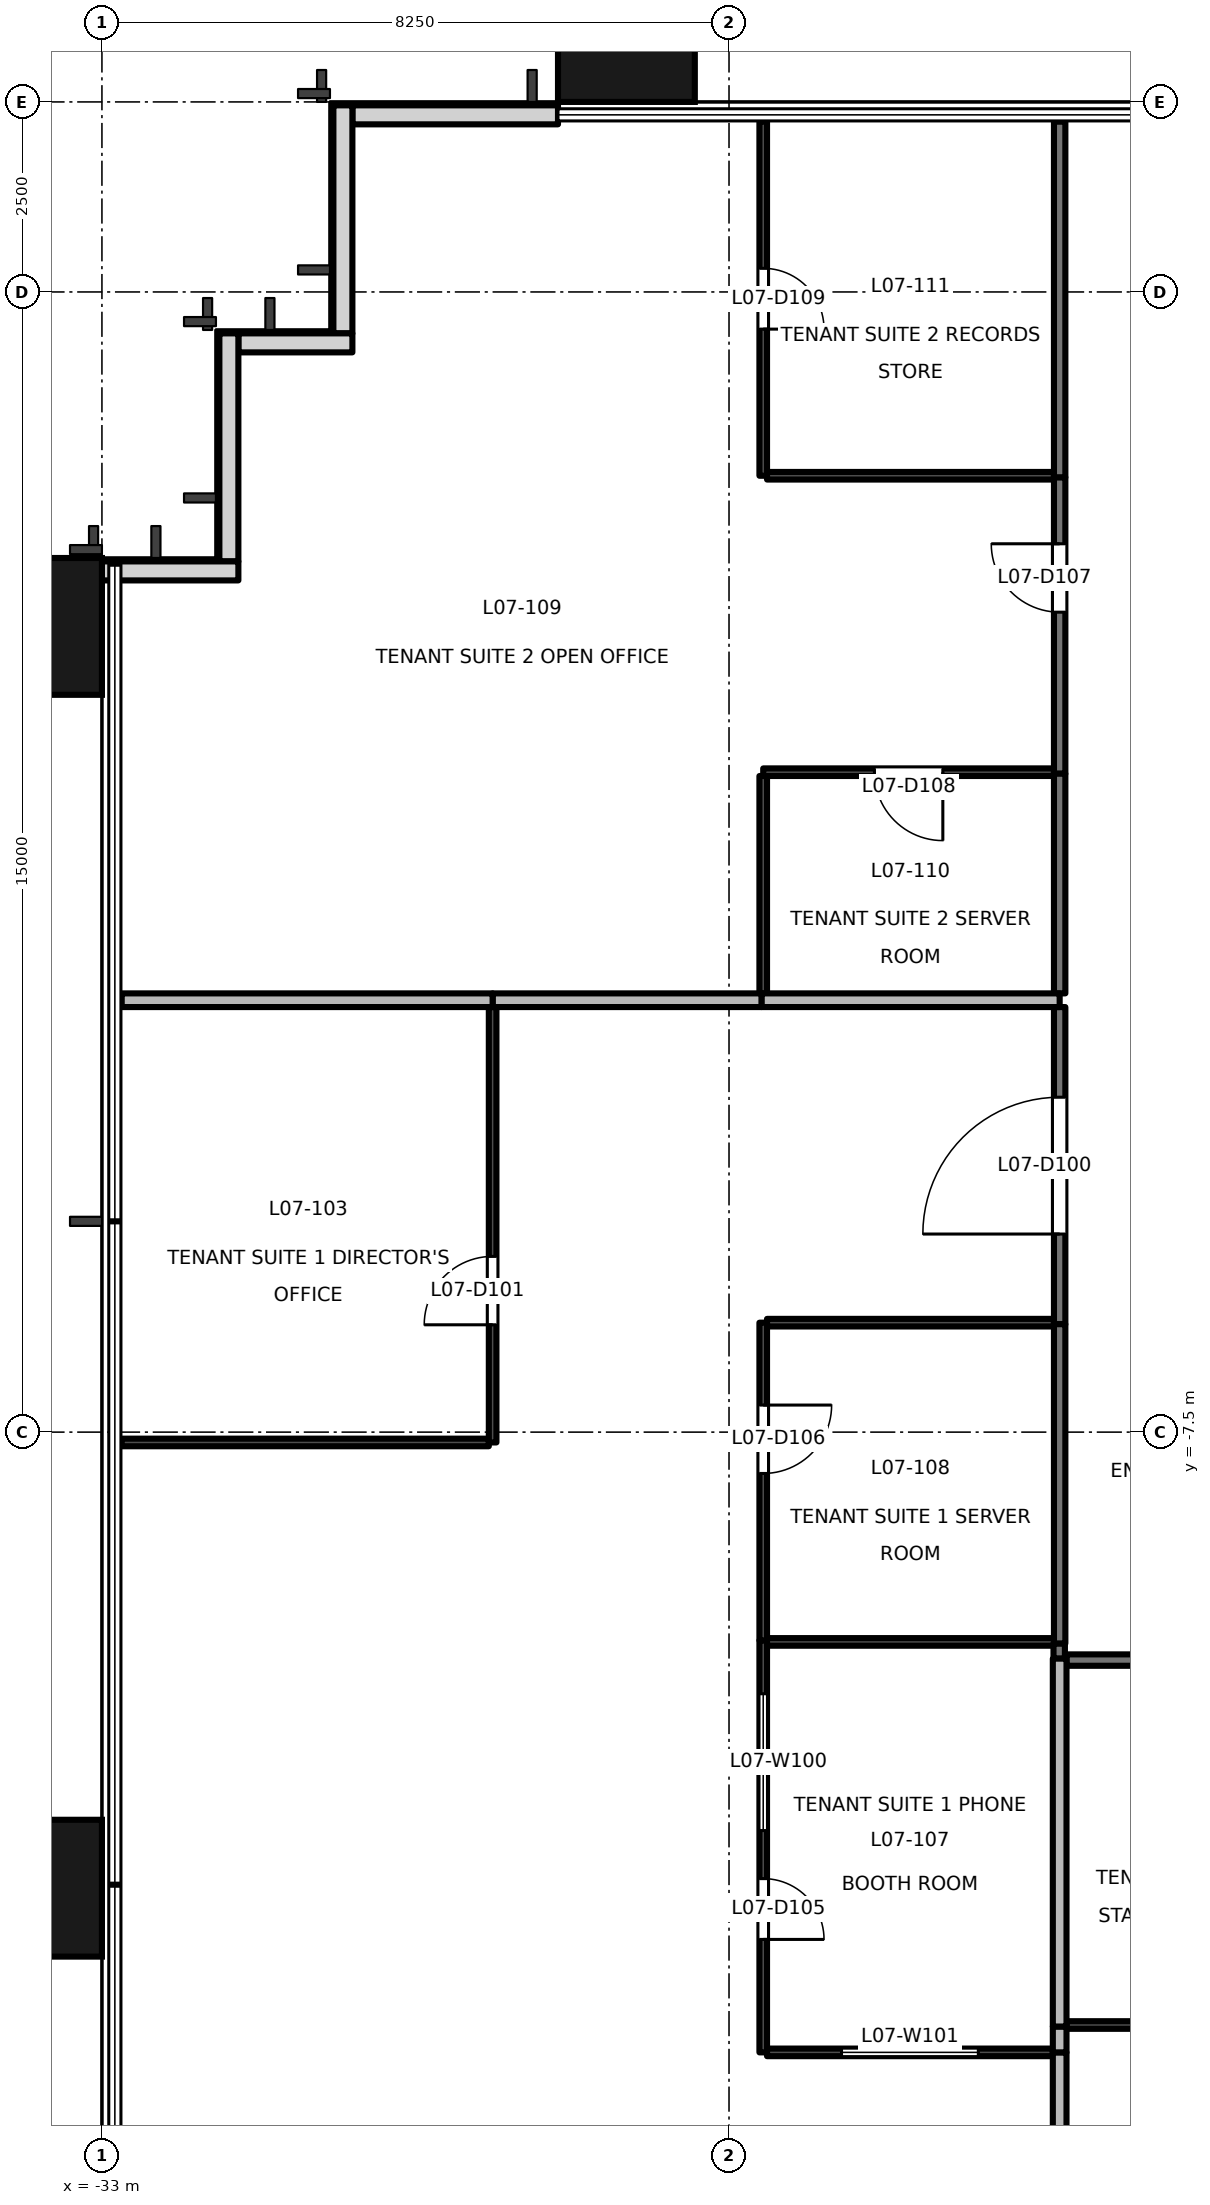
"""IFC4 building model, lengths in metres.
Left out: names, types, materials, properties, quantities, classifications, styles, units other than length and angle.
Written with IfcOpenShell. Run it as: python <this file> out.ifc"""

import sys

from ifc_helpers import new_model, si_unit, direction, frame, frame_2d, origin, origin_2d, place, context, subcontext, project, spatial, rectangle, extrude, element, fill, save


model = new_model("IFC4")
c1 = context("Model", 3, precision=1e-05, world=origin(), true_north=direction((0.0, 1.0)))
c2 = subcontext(c1, "Body", "Model", "MODEL_VIEW")
j1 = project(units=[si_unit("LENGTHUNIT", "METRE"), si_unit("PLANEANGLEUNIT", "RADIAN")], contexts=[c1])
p1 = place(None, origin())
s1 = spatial("IfcSite", under=j1, at=p1, CompositionType="ELEMENT")
p2 = place(p1, origin())
s2 = spatial("IfcBuilding", under=s1, at=p2, CompositionType="ELEMENT")
p3 = place(p2, frame((0.0, 0.0, 36.5)))
s3 = spatial("IfcBuildingStorey", under=s2, at=p3, CompositionType="ELEMENT", Elevation=36.5)
for number, where, z_axis, x_axis in (
    (1, (-33.9, -13.5, -0.2), (0.0, 0.0, 1.0), (0.0, 1.0, 0.0)),
    (2, (-33.9, 3.1, -0.2), (0.0, 0.0, 1.0), (0.0, 1.0, 0.0)),
    (3, (-26.1, 10.9, -0.2), (0.0, 0.0, 1.0), (1.0, 0.0, 0.0)),
):
    element("IfcColumn", number, at=place(p3, frame(where, z_axis=z_axis, x_axis=x_axis)), inside=s3, PredefinedType="COLUMN", context=c2, shape_type="SweptSolid", body=[
        extrude(rectangle(XDim=1.8, YDim=1.8, at=origin_2d()), origin(), (0.0, 0.0, 1.0), 4.1),
    ])
p4 = place(p3, frame((-27.0, 9.83, 0.0), z_axis=(0.0, 0.0, 1.0), x_axis=(-1.0, 0.0, 0.0)))
e4 = element("IfcWall", 4, at=p4, inside=s3, PredefinedType="SOLIDWALL", context=c2, shape_type="SweptSolid", body=[
    extrude(rectangle(XDim=2.705, YDim=0.25, at=frame_2d((1.353, 0.0))), origin(), (0.0, 0.0, 1.0), 3.9),
])
p5 = place(p3, frame((-29.83, 9.955, 0.0), z_axis=(0.0, 0.0, 1.0), x_axis=(0.0, -1.0, 0.0)))
e5 = element("IfcWall", 5, at=p5, inside=s3, PredefinedType="SOLIDWALL", context=c2, shape_type="SweptSolid", body=[
    extrude(rectangle(XDim=3.0, YDim=0.25, at=frame_2d((1.5, 0.0))), origin(), (0.0, 0.0, 1.0), 3.9),
])
p6 = place(p3, frame((-29.705, 6.83, 0.0), z_axis=(0.0, 0.0, 1.0), x_axis=(-1.0, 0.0, 0.0)))
e6 = element("IfcWall", 6, at=p6, inside=s3, PredefinedType="SOLIDWALL", context=c2, shape_type="SweptSolid", body=[
    extrude(rectangle(XDim=1.5, YDim=0.25, at=frame_2d((0.75, 0.0))), origin(), (0.0, 0.0, 1.0), 3.9),
])
p7 = place(p3, frame((-31.33, 6.955, 0.0), z_axis=(0.0, 0.0, 1.0), x_axis=(0.0, -1.0, 0.0)))
e7 = element("IfcWall", 7, at=p7, inside=s3, PredefinedType="SOLIDWALL", context=c2, shape_type="SweptSolid", body=[
    extrude(rectangle(XDim=3.0, YDim=0.25, at=frame_2d((1.5, 0.0))), origin(), (0.0, 0.0, 1.0), 3.9),
])
p8 = place(p3, frame((-31.205, 3.83, 0.0), z_axis=(0.0, 0.0, 1.0), x_axis=(-1.0, 0.0, 0.0)))
e8 = element("IfcWall", 8, at=p8, inside=s3, PredefinedType="SOLIDWALL", context=c2, shape_type="SweptSolid", body=[
    extrude(rectangle(XDim=1.8, YDim=0.25, at=frame_2d((0.9, 0.0))), origin(), (0.0, 0.0, 1.0), 3.9),
])
p9 = place(p3, frame((-20.4, -6.08, 0.0), z_axis=(0.0, 0.0, 1.0), x_axis=(0.0, 1.0, 0.0)))
e9 = element("IfcWall", 9, at=p9, inside=s3, PredefinedType="PARTITIONING", context=c2, shape_type="SweptSolid", body=[
    extrude(rectangle(XDim=4.172, YDim=0.15, at=frame_2d((2.086, 0.0))), origin(), (0.0, 0.0, 1.0), 3.3),
])
p10 = place(p9, frame((1.186, 0.0, 0.0)))
e10 = element("IfcOpeningElement", 10, at=p10, cuts=e9, PredefinedType="OPENING", context=c2, shape_type="SweptSolid", body=[
    extrude(rectangle(XDim=1.8, YDim=2.1, at=frame_2d((0.9, 1.05))), frame((0.0, 0.085, 0.0), z_axis=(0.0, -1.0, 0.0), x_axis=(1.0, 0.0, 0.0)), (0.0, 0.0, 1.0), 0.171),
])
p11 = place(p3, frame((-20.406, -10.48, 0.0), z_axis=(0.0, 0.0, 1.0), x_axis=(0.0, 1.0, 0.0)))
e11 = element("IfcWall", 11, at=p11, inside=s3, PredefinedType="PARTITIONING", context=c2, shape_type="SweptSolid", body=[
    extrude(rectangle(XDim=0.2, YDim=0.15, at=frame_2d((0.1, 0.0))), origin(), (0.0, 0.0, 1.0), 3.9),
])
p12 = place(p3, frame((-20.4, -10.28, 0.0), z_axis=(0.0, 0.0, 1.0), x_axis=(0.0, 1.0, 0.0)))
e12 = element("IfcWall", 12, at=p12, inside=s3, PredefinedType="PARTITIONING", context=c2, shape_type="SweptSolid", body=[
    extrude(rectangle(XDim=4.2, YDim=0.15, at=frame_2d((2.1, 0.0))), origin(), (0.0, 0.0, 1.0), 3.3),
])
p13 = place(p3, frame((-20.4, 1.162, 0.0), z_axis=(0.0, 0.0, 1.0), x_axis=(0.0, 1.0, 0.0)))
e13 = element("IfcWall", 13, at=p13, inside=s3, PredefinedType="PARTITIONING", context=c2, shape_type="SweptSolid", body=[
    extrude(rectangle(XDim=3.9, YDim=0.15, at=frame_2d((1.95, 0.0))), origin(), (0.0, 0.0, 1.0), 3.9),
])
p14 = place(p13, frame((2.125, 0.0, 0.0)))
e14 = element("IfcOpeningElement", 14, at=p14, cuts=e13, PredefinedType="OPENING", context=c2, shape_type="SweptSolid", body=[
    extrude(rectangle(XDim=0.9, YDim=2.1, at=frame_2d((0.45, 1.05))), frame((0.0, 0.085, 0.0), z_axis=(0.0, -1.0, 0.0), x_axis=(1.0, 0.0, 0.0)), (0.0, 0.0, 1.0), 0.171),
])
p15 = place(p3, frame((-20.4, -1.728, 0.0), z_axis=(0.0, 0.0, 1.0), x_axis=(0.0, 1.0, 0.0)))
e15 = element("IfcWall", 15, at=p15, inside=s3, PredefinedType="PARTITIONING", context=c2, shape_type="SweptSolid", body=[
    extrude(rectangle(XDim=2.89, YDim=0.15, at=frame_2d((1.445, 0.0))), origin(), (0.0, 0.0, 1.0), 3.3),
])
p16 = place(p3, frame((-20.4, 5.062, 0.0), z_axis=(0.0, 0.0, 1.0), x_axis=(0.0, 1.0, 0.0)))
e16 = element("IfcWall", 16, at=p16, inside=s3, PredefinedType="PARTITIONING", context=c2, shape_type="SweptSolid", body=[
    extrude(rectangle(XDim=4.678, YDim=0.15, at=frame_2d((2.339, 0.0))), origin(), (0.0, 0.0, 1.0), 3.9),
])
p17 = place(p3, frame((-17.42, -10.499, 0.0), z_axis=(0.0, 0.0, 1.0), x_axis=(-1.0, 0.0, 0.0)))
e17 = element("IfcWall", 17, at=p17, inside=s3, PredefinedType="PARTITIONING", context=c2, shape_type="SweptSolid", body=[
    extrude(rectangle(XDim=2.89, YDim=0.15, at=frame_2d((1.445, 0.0))), origin(), (0.0, 0.0, 1.0), 2.5),
])
p18 = place(p3, frame((-32.74, -7.636, 0.0), z_axis=(0.0, 0.0, 1.0), x_axis=(1.0, 0.0, 0.0)))
e18 = element("IfcWall", 18, at=p18, inside=s3, PredefinedType="PARTITIONING", context=c2, shape_type="SweptSolid", body=[
    extrude(rectangle(XDim=4.83, YDim=0.1, at=frame_2d((2.415, 0.0))), origin(), (0.0, 0.0, 1.0), 3.9),
])
p19 = place(p3, frame((-27.86, -7.636, 0.0), z_axis=(0.0, 0.0, 1.0), x_axis=(0.0, 1.0, 0.0)))
e19 = element("IfcWall", 19, at=p19, inside=s3, PredefinedType="PARTITIONING", context=c2, shape_type="SweptSolid", body=[
    extrude(rectangle(XDim=5.728, YDim=0.1, at=frame_2d((2.864, 0.0))), origin(), (0.0, 0.0, 1.0), 3.3),
])
p20 = place(p19, frame((1.548, 0.0, 0.0)))
e20 = element("IfcOpeningElement", 20, at=p20, cuts=e19, PredefinedType="OPENING", context=c2, shape_type="SweptSolid", body=[
    extrude(rectangle(XDim=0.9, YDim=2.1, at=frame_2d((0.45, 1.05))), frame((0.0, 0.061, 0.0), z_axis=(0.0, -1.0, 0.0), x_axis=(1.0, 0.0, 0.0)), (0.0, 0.0, 1.0), 0.121),
])
p21 = place(p3, frame((-24.3, -10.24, 0.0), z_axis=(0.0, 0.0, 1.0), x_axis=(0.0, -1.0, 0.0)))
e21 = element("IfcWall", 21, at=p21, inside=s3, PredefinedType="PARTITIONING", context=c2, shape_type="SweptSolid", body=[
    extrude(rectangle(XDim=5.42, YDim=0.1, at=frame_2d((2.71, 0.0))), origin(), (0.0, 0.0, 1.0), 3.3),
])
p22 = place(p21, frame((3.134, 0.0, 0.0)))
e22 = element("IfcOpeningElement", 22, at=p22, cuts=e21, PredefinedType="OPENING", context=c2, shape_type="SweptSolid", body=[
    extrude(rectangle(XDim=0.8, YDim=2.1, at=frame_2d((0.4, 1.05))), frame((0.0, 0.061, 0.0), z_axis=(0.0, -1.0, 0.0), x_axis=(1.0, 0.0, 0.0)), (0.0, 0.0, 1.0), 0.121),
])
p23 = place(p21, frame((0.702, 0.0, 0.9)))
e23 = element("IfcOpeningElement", 23, at=p23, cuts=e21, PredefinedType="OPENING", context=c2, shape_type="SweptSolid", body=[
    extrude(rectangle(XDim=1.8, YDim=1.2, at=frame_2d((0.9, 0.6))), frame((0.0, 0.061, 0.0), z_axis=(0.0, -1.0, 0.0), x_axis=(1.0, 0.0, 0.0)), (0.0, 0.0, 1.0), 0.121),
])
p24 = place(p3, frame((-24.25, -15.66, 0.0), z_axis=(0.0, 0.0, 1.0), x_axis=(1.0, 0.0, 0.0)))
e24 = element("IfcWall", 24, at=p24, inside=s3, PredefinedType="PARTITIONING", context=c2, shape_type="SweptSolid", body=[
    extrude(rectangle(XDim=3.76, YDim=0.1, at=frame_2d((1.88, 0.0))), origin(), (0.0, 0.0, 1.0), 3.9),
])
p25 = place(p24, frame((0.98, 0.0, 0.9)))
e25 = element("IfcOpeningElement", 25, at=p25, cuts=e24, PredefinedType="OPENING", context=c2, shape_type="SweptSolid", body=[
    extrude(rectangle(XDim=1.8, YDim=1.2, at=frame_2d((0.9, 0.6))), frame((0.0, 0.061, 0.0), z_axis=(0.0, -1.0, 0.0), x_axis=(1.0, 0.0, 0.0)), (0.0, 0.0, 1.0), 0.121),
])
p26 = place(p3, frame((-24.3, -6.06, 0.0), z_axis=(0.0, 0.0, 1.0), x_axis=(0.0, -1.0, 0.0)))
e26 = element("IfcWall", 26, at=p26, inside=s3, PredefinedType="PARTITIONING", context=c2, shape_type="SweptSolid", body=[
    extrude(rectangle(XDim=4.18, YDim=0.1, at=frame_2d((2.09, 0.0))), origin(), (0.0, 0.0, 1.0), 3.3),
])
p27 = place(p26, frame((1.084, 0.0, 0.0)))
e27 = element("IfcOpeningElement", 27, at=p27, cuts=e26, PredefinedType="OPENING", context=c2, shape_type="SweptSolid", body=[
    extrude(rectangle(XDim=0.9, YDim=2.1, at=frame_2d((0.45, 1.05))), frame((0.0, 0.061, 0.0), z_axis=(0.0, -1.0, 0.0), x_axis=(1.0, 0.0, 0.0)), (0.0, 0.0, 1.0), 0.121),
])
p28 = place(p3, frame((-20.475, -6.06, 0.0), z_axis=(0.0, 0.0, 1.0), x_axis=(-1.0, 0.0, 0.0)))
e28 = element("IfcWall", 28, at=p28, inside=s3, PredefinedType="PARTITIONING", context=c2, shape_type="SweptSolid", body=[
    extrude(rectangle(XDim=3.775, YDim=0.1, at=frame_2d((1.887, 0.0))), origin(), (0.0, 0.0, 1.0), 3.9),
])
p29 = place(p3, frame((-27.86, -1.818, 0.0), z_axis=(0.0, 0.0, 1.0), x_axis=(1.0, 0.0, 0.0)))
e29 = element("IfcWall", 29, at=p29, inside=s3, PredefinedType="PARTITIONING", context=c2, shape_type="SweptSolid", body=[
    extrude(rectangle(XDim=3.54, YDim=0.18, at=frame_2d((1.77, 0.0))), origin(), (0.0, 0.0, 1.0), 3.9),
])
p30 = place(p3, frame((-24.32, -1.818, 0.0), z_axis=(0.0, 0.0, 1.0), x_axis=(1.0, 0.0, 0.0)))
e30 = element("IfcWall", 30, at=p30, inside=s3, PredefinedType="PARTITIONING", context=c2, shape_type="SweptSolid", body=[
    extrude(rectangle(XDim=3.92, YDim=0.18, at=frame_2d((1.96, 0.0))), origin(), (0.0, 0.0, 1.0), 3.9),
])
p31 = place(p3, frame((-20.4, -15.66, 0.0), z_axis=(0.0, 0.0, 1.0), x_axis=(0.0, -1.0, 0.0)))
e31 = element("IfcWall", 31, at=p31, inside=s3, PredefinedType="PARTITIONING", context=c2, shape_type="SweptSolid", body=[
    extrude(rectangle(XDim=6.0, YDim=0.18, at=frame_2d((3.0, 0.0))), origin(), (0.0, 0.0, 1.0), 3.3),
])
p32 = place(p3, frame((-32.74, -1.818, 0.0), z_axis=(0.0, 0.0, 1.0), x_axis=(1.0, 0.0, 0.0)))
e32 = element("IfcWall", 32, at=p32, inside=s3, PredefinedType="PARTITIONING", context=c2, shape_type="SweptSolid", body=[
    extrude(rectangle(XDim=4.88, YDim=0.18, at=frame_2d((2.44, 0.0))), origin(), (0.0, 0.0, 1.0), 3.9),
])
p33 = place(p3, frame((-24.25, -10.26, 0.0), z_axis=(0.0, 0.0, 1.0), x_axis=(1.0, 0.0, 0.0)))
e33 = element("IfcWall", 33, at=p33, inside=s3, PredefinedType="PARTITIONING", context=c2, shape_type="SweptSolid", body=[
    extrude(rectangle(XDim=3.775, YDim=0.1, at=frame_2d((1.887, 0.0))), origin(), (0.0, 0.0, 1.0), 3.9),
])
p34 = place(p3, frame((-20.4, -15.32, 0.0), z_axis=(0.0, 0.0, 1.0), x_axis=(0.0, -1.0, 0.0)))
e34 = element("IfcWall", 34, at=p34, inside=s3, PredefinedType="PARTITIONING", context=c2, shape_type="SweptSolid", body=[
    extrude(rectangle(XDim=0.34, YDim=0.18, at=frame_2d((0.17, 0.0))), origin(), (0.0, 0.0, 1.0), 3.9),
])
p35 = place(p3, frame((-20.4, -10.48, 0.0), z_axis=(0.0, 0.0, 1.0), x_axis=(0.0, -1.0, 0.0)))
e35 = element("IfcWall", 35, at=p35, inside=s3, PredefinedType="PARTITIONING", context=c2, shape_type="SweptSolid", body=[
    extrude(rectangle(XDim=4.84, YDim=0.18, at=frame_2d((2.42, 0.0))), origin(), (0.0, 0.0, 1.0), 3.3),
])
p36 = place(p3, frame((-24.3, 1.132, 0.0), z_axis=(0.0, 0.0, 1.0), x_axis=(0.0, -1.0, 0.0)))
e36 = element("IfcWall", 36, at=p36, inside=s3, PredefinedType="PARTITIONING", context=c2, shape_type="SweptSolid", body=[
    extrude(rectangle(XDim=2.86, YDim=0.1, at=frame_2d((1.43, 0.0))), origin(), (0.0, 0.0, 1.0), 3.3),
])
p37 = place(p3, frame((-20.475, 1.182, 0.0), z_axis=(0.0, 0.0, 1.0), x_axis=(-1.0, 0.0, 0.0)))
e37 = element("IfcWall", 37, at=p37, inside=s3, PredefinedType="PARTITIONING", context=c2, shape_type="SweptSolid", body=[
    extrude(rectangle(XDim=3.825, YDim=0.1, at=frame_2d((1.913, 0.0))), origin(), (0.0, 0.0, 1.0), 3.9),
])
p38 = place(p37, frame((1.462, 0.0, 0.0)))
e38 = element("IfcOpeningElement", 38, at=p38, cuts=e37, PredefinedType="OPENING", context=c2, shape_type="SweptSolid", body=[
    extrude(rectangle(XDim=0.9, YDim=2.1, at=frame_2d((0.45, 1.05))), frame((0.0, 0.061, 0.0), z_axis=(0.0, -1.0, 0.0), x_axis=(1.0, 0.0, 0.0)), (0.0, 0.0, 1.0), 0.121),
])
p39 = place(p3, frame((-24.3, 9.74, 0.0), z_axis=(0.0, 0.0, 1.0), x_axis=(0.0, -1.0, 0.0)))
e39 = element("IfcWall", 39, at=p39, inside=s3, PredefinedType="PARTITIONING", context=c2, shape_type="SweptSolid", body=[
    extrude(rectangle(XDim=4.658, YDim=0.1, at=frame_2d((2.329, 0.0))), origin(), (0.0, 0.0, 1.0), 3.9),
])
p40 = place(p39, frame((1.929, 0.0, 0.0)))
e40 = element("IfcOpeningElement", 40, at=p40, cuts=e39, PredefinedType="OPENING", context=c2, shape_type="SweptSolid", body=[
    extrude(rectangle(XDim=0.8, YDim=2.1, at=frame_2d((0.4, 1.05))), frame((0.0, 0.061, 0.0), z_axis=(0.0, -1.0, 0.0), x_axis=(1.0, 0.0, 0.0)), (0.0, 0.0, 1.0), 0.121),
])
p41 = place(p3, frame((-24.25, 5.082, 0.0), z_axis=(0.0, 0.0, 1.0), x_axis=(1.0, 0.0, 0.0)))
e41 = element("IfcWall", 41, at=p41, inside=s3, PredefinedType="PARTITIONING", context=c2, shape_type="SweptSolid", body=[
    extrude(rectangle(XDim=3.775, YDim=0.1, at=frame_2d((1.887, 0.0))), origin(), (0.0, 0.0, 1.0), 3.9),
])
p42 = place(p3, frame((-20.31, -15.3, 0.0), z_axis=(0.0, 0.0, 1.0), x_axis=(1.0, 0.0, 0.0)))
e42 = element("IfcWall", 42, at=p42, inside=s3, PredefinedType="PARTITIONING", context=c2, shape_type="SweptSolid", body=[
    extrude(rectangle(XDim=2.86, YDim=0.1, at=frame_2d((1.43, 0.0))), origin(), (0.0, 0.0, 1.0), 2.5),
])
p43 = place(p10, origin())
e43 = element("IfcDoor", 43, at=p43, inside=s3, OperationType="DOUBLE_DOOR_SINGLE_SWING", PredefinedType="DOOR", context=c2, shape_type="SweptSolid", body=[
    extrude(rectangle(XDim=1.8, YDim=2.1, at=frame_2d((0.9, 1.05))), frame((0.0, 0.025, 0.0), z_axis=(0.0, -1.0, 0.0), x_axis=(1.0, 0.0, 0.0)), (0.0, 0.0, 1.0), 0.05),
])
fill(e10, e43)
p44 = place(p20, origin())
e44 = element("IfcDoor", 44, at=p44, inside=s3, OperationType="SINGLE_SWING_LEFT", PredefinedType="DOOR", context=c2, shape_type="SweptSolid", body=[
    extrude(rectangle(XDim=0.9, YDim=2.1, at=frame_2d((0.45, 1.05))), frame((0.0, 0.025, 0.0), z_axis=(0.0, -1.0, 0.0), x_axis=(1.0, 0.0, 0.0)), (0.0, 0.0, 1.0), 0.05),
])
fill(e20, e44)
p45 = place(p22, origin())
e45 = element("IfcDoor", 45, at=p45, inside=s3, OperationType="SINGLE_SWING_RIGHT", PredefinedType="DOOR", context=c2, shape_type="SweptSolid", body=[
    extrude(rectangle(XDim=0.8, YDim=2.1, at=frame_2d((0.4, 1.05))), frame((0.0, 0.025, 0.0), z_axis=(0.0, -1.0, 0.0), x_axis=(1.0, 0.0, 0.0)), (0.0, 0.0, 1.0), 0.05),
])
fill(e22, e45)
p46 = place(p27, origin())
e46 = element("IfcDoor", 46, at=p46, inside=s3, OperationType="SINGLE_SWING_LEFT", PredefinedType="DOOR", context=c2, shape_type="SweptSolid", body=[
    extrude(rectangle(XDim=0.9, YDim=2.1, at=frame_2d((0.45, 1.05))), frame((0.0, 0.025, 0.0), z_axis=(0.0, -1.0, 0.0), x_axis=(1.0, 0.0, 0.0)), (0.0, 0.0, 1.0), 0.05),
])
fill(e27, e46)
p47 = place(p14, origin())
e47 = element("IfcDoor", 47, at=p47, inside=s3, OperationType="SINGLE_SWING_RIGHT", PredefinedType="DOOR", context=c2, shape_type="SweptSolid", body=[
    extrude(rectangle(XDim=0.9, YDim=2.1, at=frame_2d((0.45, 1.05))), frame((0.0, 0.025, 0.0), z_axis=(0.0, -1.0, 0.0), x_axis=(1.0, 0.0, 0.0)), (0.0, 0.0, 1.0), 0.05),
])
fill(e14, e47)
p48 = place(p38, origin())
e48 = element("IfcDoor", 48, at=p48, inside=s3, OperationType="SINGLE_SWING_LEFT", PredefinedType="DOOR", context=c2, shape_type="SweptSolid", body=[
    extrude(rectangle(XDim=0.9, YDim=2.1, at=frame_2d((0.45, 1.05))), frame((0.0, 0.025, 0.0), z_axis=(0.0, -1.0, 0.0), x_axis=(1.0, 0.0, 0.0)), (0.0, 0.0, 1.0), 0.05),
])
fill(e38, e48)
p49 = place(p40, origin())
e49 = element("IfcDoor", 49, at=p49, inside=s3, OperationType="SINGLE_SWING_RIGHT", PredefinedType="DOOR", context=c2, shape_type="SweptSolid", body=[
    extrude(rectangle(XDim=0.8, YDim=2.1, at=frame_2d((0.4, 1.05))), frame((0.0, 0.025, 0.0), z_axis=(0.0, -1.0, 0.0), x_axis=(1.0, 0.0, 0.0)), (0.0, 0.0, 1.0), 0.05),
])
fill(e40, e49)
p50 = place(p23, origin())
e50 = element("IfcWindow", 50, at=p50, inside=s3, PartitioningType="SINGLE_PANEL", PredefinedType="WINDOW", context=c2, shape_type="SweptSolid", body=[
    extrude(rectangle(XDim=1.8, YDim=1.2, at=frame_2d((0.9, 0.6))), frame((0.0, 0.03, 0.0), z_axis=(0.0, -1.0, 0.0), x_axis=(1.0, 0.0, 0.0)), (0.0, 0.0, 1.0), 0.06),
])
fill(e23, e50)
p51 = place(p25, origin())
e51 = element("IfcWindow", 51, at=p51, inside=s3, PartitioningType="SINGLE_PANEL", PredefinedType="WINDOW", context=c2, shape_type="SweptSolid", body=[
    extrude(rectangle(XDim=1.8, YDim=1.2, at=frame_2d((0.9, 0.6))), frame((0.0, 0.03, 0.0), z_axis=(0.0, -1.0, 0.0), x_axis=(1.0, 0.0, 0.0)), (0.0, 0.0, 1.0), 0.06),
])
fill(e25, e51)
save(model, sys.argv[1])
